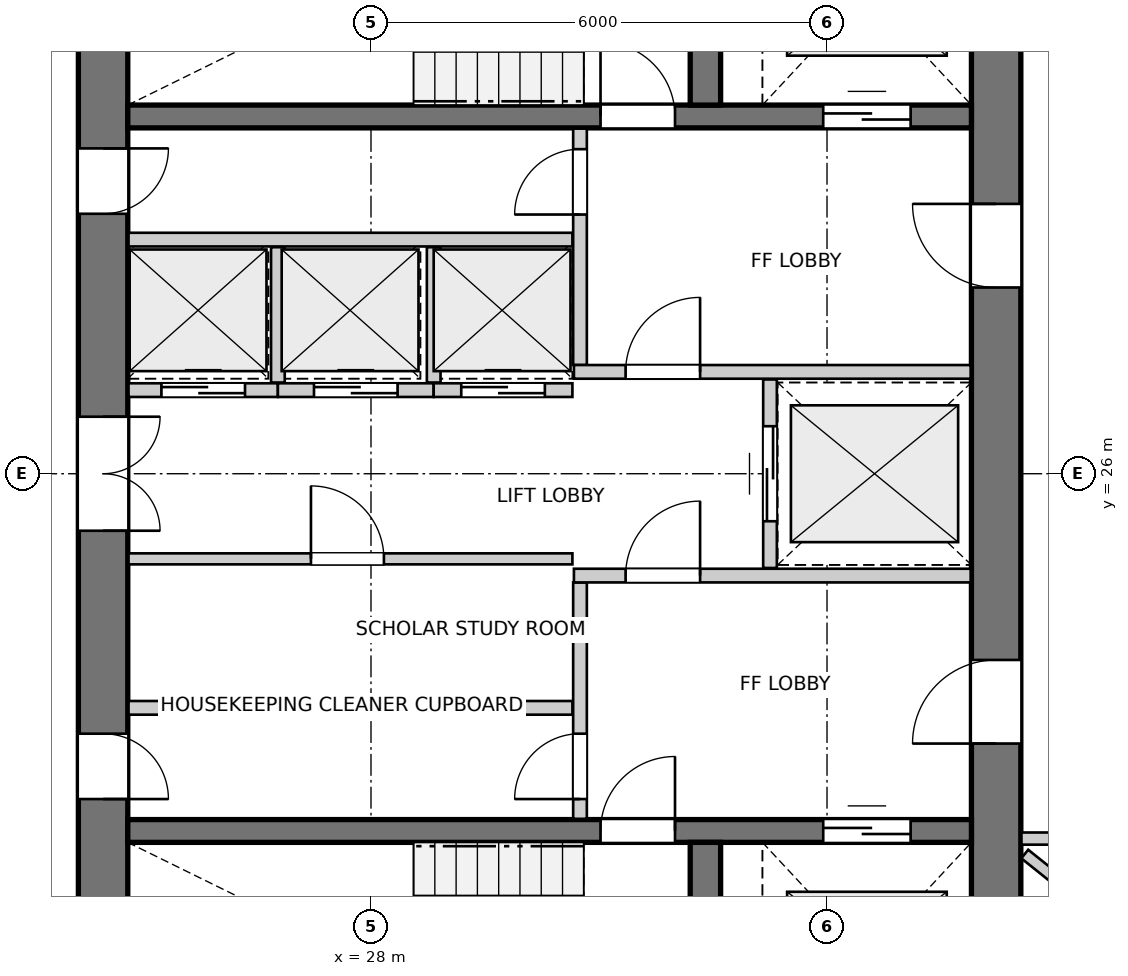
"""IFC4 building model, lengths in metres.
Left out: names, types, materials, properties, quantities, classifications, styles, units other than length and angle.
Written with IfcOpenShell. Run it as: python <this file> out.ifc"""

import sys

from ifc_helpers import new_model, si_unit, direction, frame, frame_2d, origin, place, context, subcontext, project, spatial, rectangle, extrude, source, transform, mapped, element, fill, save


model = new_model("IFC4")
c1 = context("Model", 3, precision=1e-05, world=origin(), true_north=direction((0.0, 1.0)))
c2 = subcontext(c1, "Body", "Model", "MODEL_VIEW")
j1 = project(units=[si_unit("LENGTHUNIT", "METRE"), si_unit("PLANEANGLEUNIT", "RADIAN")], contexts=[c1])
p1 = place(None, origin())
s1 = spatial("IfcSite", under=j1, at=p1, CompositionType="ELEMENT")
p2 = place(p1, origin())
s2 = spatial("IfcBuilding", under=s1, at=p2, CompositionType="ELEMENT")
p3 = place(p2, frame((0.0, 0.0, 136.2)))
s3 = spatial("IfcBuildingStorey", under=s2, at=p3, CompositionType="ELEMENT", Elevation=136.2)
p4 = place(p3, frame((24.475, 33.8, 0.0), z_axis=(0.0, 0.0, 1.0), x_axis=(0.0, -1.0, 0.0)))
e1 = element("IfcWall", 1, at=p4, inside=s3, PredefinedType="SHEAR", context=c2, shape_type="SweptSolid", body=[
    extrude(rectangle(XDim=15.6, YDim=0.65, at=frame_2d((7.8, 0.0))), origin(), (0.0, 0.0, 1.0), 2.95),
])
p5 = place(p4, frame((7.05, 0.0, 0.0)))
e2 = element("IfcOpeningElement", 2, at=p5, cuts=e1, PredefinedType="OPENING", context=c2, shape_type="SweptSolid", body=[
    extrude(rectangle(XDim=1.5, YDim=2.15, at=frame_2d((0.75, 1.075))), frame((0.0, 0.335, 0.0), z_axis=(0.0, -1.0, 0.0), x_axis=(1.0, 0.0, 0.0)), (0.0, 0.0, 1.0), 0.67),
])
p6 = place(p4, frame((3.52, 0.0, 0.0)))
e3 = element("IfcOpeningElement", 3, at=p6, cuts=e1, PredefinedType="OPENING", context=c2, shape_type="SweptSolid", body=[
    extrude(rectangle(XDim=0.86, YDim=2.05, at=frame_2d((0.43, 1.025))), frame((0.0, 0.335, 0.0), z_axis=(0.0, -1.0, 0.0), x_axis=(1.0, 0.0, 0.0)), (0.0, 0.0, 1.0), 0.67),
])
p7 = place(p4, frame((11.22, 0.0, 0.0)))
e4 = element("IfcOpeningElement", 4, at=p7, cuts=e1, PredefinedType="OPENING", context=c2, shape_type="SweptSolid", body=[
    extrude(rectangle(XDim=0.86, YDim=2.05, at=frame_2d((0.43, 1.025))), frame((0.0, 0.335, 0.0), z_axis=(0.0, -1.0, 0.0), x_axis=(1.0, 0.0, 0.0)), (0.0, 0.0, 1.0), 0.67),
])
p8 = place(p3, frame((36.225, 18.2, 0.0), z_axis=(0.0, 0.0, 1.0), x_axis=(0.0, 1.0, 0.0)))
e5 = element("IfcWall", 5, at=p8, inside=s3, PredefinedType="SHEAR", context=c2, shape_type="SweptSolid", body=[
    extrude(rectangle(XDim=15.6, YDim=0.65, at=frame_2d((7.8, 0.0))), origin(), (0.0, 0.0, 1.0), 2.95),
])
p9 = place(p8, frame((4.25, 0.0, 0.0)))
e6 = element("IfcOpeningElement", 6, at=p9, cuts=e5, PredefinedType="OPENING", context=c2, shape_type="SweptSolid", body=[
    extrude(rectangle(XDim=1.1, YDim=2.15, at=frame_2d((0.55, 1.075))), frame((0.0, 0.335, 0.0), z_axis=(0.0, -1.0, 0.0), x_axis=(1.0, 0.0, 0.0)), (0.0, 0.0, 1.0), 0.67),
])
p10 = place(p8, frame((10.25, 0.0, 0.0)))
e7 = element("IfcOpeningElement", 7, at=p10, cuts=e5, PredefinedType="OPENING", context=c2, shape_type="SweptSolid", body=[
    extrude(rectangle(XDim=1.1, YDim=2.15, at=frame_2d((0.55, 1.075))), frame((0.0, 0.335, 0.0), z_axis=(0.0, -1.0, 0.0), x_axis=(1.0, 0.0, 0.0)), (0.0, 0.0, 1.0), 0.67),
])
p11 = place(p3, frame((24.8, 21.3, 0.0), z_axis=(0.0, 0.0, 1.0), x_axis=(1.0, 0.0, 0.0)))
e8 = element("IfcWall", 8, at=p11, inside=s3, PredefinedType="SHEAR", context=c2, shape_type="SweptSolid", body=[
    extrude(rectangle(XDim=11.1, YDim=0.3, at=frame_2d((5.55, 0.0))), origin(), (0.0, 0.0, 1.0), 2.95),
])
p12 = place(p11, frame((6.22, 0.0, 0.0)))
e9 = element("IfcOpeningElement", 9, at=p12, cuts=e8, PredefinedType="OPENING", context=c2, shape_type="SweptSolid", body=[
    extrude(rectangle(XDim=0.98, YDim=2.15, at=frame_2d((0.49, 1.075))), frame((0.0, 0.16, 0.0), z_axis=(0.0, -1.0, 0.0), x_axis=(1.0, 0.0, 0.0)), (0.0, 0.0, 1.0), 0.32),
])
p13 = place(p11, frame((9.15, 0.0, 0.0)))
e10 = element("IfcOpeningElement", 10, at=p13, cuts=e8, PredefinedType="OPENING", context=c2, shape_type="SweptSolid", body=[
    extrude(rectangle(XDim=1.15, YDim=2.15, at=frame_2d((0.575, 1.075))), frame((0.0, 0.16, 0.0), z_axis=(0.0, -1.0, 0.0), x_axis=(1.0, 0.0, 0.0)), (0.0, 0.0, 1.0), 0.32),
])
p14 = place(p3, frame((32.4, 18.2, 0.0), z_axis=(0.0, 0.0, 1.0), x_axis=(0.0, 1.0, 0.0)))
e11 = element("IfcWall", 11, at=p14, inside=s3, PredefinedType="SHEAR", context=c2, shape_type="SweptSolid", body=[
    extrude(rectangle(XDim=2.95, YDim=0.4, at=frame_2d((1.475, 0.0))), origin(), (0.0, 0.0, 1.0), 2.95),
])
p15 = place(p3, frame((24.8, 30.7, 0.0), z_axis=(0.0, 0.0, 1.0), x_axis=(1.0, 0.0, 0.0)))
e12 = element("IfcWall", 12, at=p15, inside=s3, PredefinedType="SHEAR", context=c2, shape_type="SweptSolid", body=[
    extrude(rectangle(XDim=11.1, YDim=0.3, at=frame_2d((5.55, 0.0))), origin(), (0.0, 0.0, 1.0), 2.95),
])
p16 = place(p15, frame((6.22, 0.0, 0.0)))
e13 = element("IfcOpeningElement", 13, at=p16, cuts=e12, PredefinedType="OPENING", context=c2, shape_type="SweptSolid", body=[
    extrude(rectangle(XDim=0.98, YDim=2.15, at=frame_2d((0.49, 1.075))), frame((0.0, 0.16, 0.0), z_axis=(0.0, -1.0, 0.0), x_axis=(1.0, 0.0, 0.0)), (0.0, 0.0, 1.0), 0.32),
])
p17 = place(p15, frame((9.15, 0.0, 0.0)))
e14 = element("IfcOpeningElement", 14, at=p17, cuts=e12, PredefinedType="OPENING", context=c2, shape_type="SweptSolid", body=[
    extrude(rectangle(XDim=1.15, YDim=2.15, at=frame_2d((0.575, 1.075))), frame((0.0, 0.16, 0.0), z_axis=(0.0, -1.0, 0.0), x_axis=(1.0, 0.0, 0.0)), (0.0, 0.0, 1.0), 0.32),
])
p18 = place(p3, frame((32.4, 30.85, 0.0), z_axis=(0.0, 0.0, 1.0), x_axis=(0.0, 1.0, 0.0)))
e15 = element("IfcWall", 15, at=p18, inside=s3, PredefinedType="SHEAR", context=c2, shape_type="SweptSolid", body=[
    extrude(rectangle(XDim=2.95, YDim=0.4, at=frame_2d((1.475, 0.0))), origin(), (0.0, 0.0, 1.0), 2.95),
])
p19 = place(p3, frame((30.75, 21.46, 0.0), z_axis=(0.0, 0.0, 1.0), x_axis=(0.0, 1.0, 0.0)))
e16 = element("IfcWall", 16, at=p19, inside=s3, PredefinedType="PARTITIONING", context=c2, shape_type="SweptSolid", body=[
    extrude(rectangle(XDim=3.11, YDim=0.18, at=frame_2d((1.555, 0.0))), origin(), (0.0, 0.0, 1.0), 2.95),
])
p20 = place(p19, frame((0.26, 0.0, 0.0)))
e17 = element("IfcOpeningElement", 17, at=p20, cuts=e16, PredefinedType="OPENING", context=c2, shape_type="SweptSolid", body=[
    extrude(rectangle(XDim=0.86, YDim=2.05, at=frame_2d((0.43, 1.025))), frame((0.0, 0.1, 0.0), z_axis=(0.0, -1.0, 0.0), x_axis=(1.0, 0.0, 0.0)), (0.0, 0.0, 1.0), 0.2),
])
p21 = place(p3, frame((30.67, 24.66, 0.0), z_axis=(0.0, 0.0, 1.0), x_axis=(1.0, 0.0, 0.0)))
e18 = element("IfcWall", 18, at=p21, inside=s3, PredefinedType="PARTITIONING", context=c2, shape_type="SweptSolid", body=[
    extrude(rectangle(XDim=5.22, YDim=0.18, at=frame_2d((2.61, 0.0))), origin(), (0.0, 0.0, 1.0), 2.95),
])
p22 = place(p21, frame((0.68, 0.0, 0.0)))
e19 = element("IfcOpeningElement", 19, at=p22, cuts=e18, PredefinedType="OPENING", context=c2, shape_type="SweptSolid", body=[
    extrude(rectangle(XDim=0.98, YDim=2.15, at=frame_2d((0.49, 1.075))), frame((0.0, 0.1, 0.0), z_axis=(0.0, -1.0, 0.0), x_axis=(1.0, 0.0, 0.0)), (0.0, 0.0, 1.0), 0.2),
])
p23 = place(p3, frame((30.75, 27.43, 0.0), z_axis=(0.0, 0.0, 1.0), x_axis=(0.0, 1.0, 0.0)))
e20 = element("IfcWall", 20, at=p23, inside=s3, PredefinedType="PARTITIONING", context=c2, shape_type="SweptSolid", body=[
    extrude(rectangle(XDim=3.11, YDim=0.18, at=frame_2d((1.555, 0.0))), origin(), (0.0, 0.0, 1.0), 2.95),
])
p24 = place(p23, frame((1.98, 0.0, 0.0)))
e21 = element("IfcOpeningElement", 21, at=p24, cuts=e20, PredefinedType="OPENING", context=c2, shape_type="SweptSolid", body=[
    extrude(rectangle(XDim=0.86, YDim=2.05, at=frame_2d((0.43, 1.025))), frame((0.0, 0.1, 0.0), z_axis=(0.0, -1.0, 0.0), x_axis=(1.0, 0.0, 0.0)), (0.0, 0.0, 1.0), 0.2),
])
p25 = place(p3, frame((30.67, 27.34, 0.0), z_axis=(0.0, 0.0, 1.0), x_axis=(1.0, 0.0, 0.0)))
e22 = element("IfcWall", 22, at=p25, inside=s3, PredefinedType="PARTITIONING", context=c2, shape_type="SweptSolid", body=[
    extrude(rectangle(XDim=5.22, YDim=0.18, at=frame_2d((2.61, 0.0))), origin(), (0.0, 0.0, 1.0), 2.95),
])
p26 = place(p25, frame((0.68, 0.0, 0.0)))
e23 = element("IfcOpeningElement", 23, at=p26, cuts=e22, PredefinedType="OPENING", context=c2, shape_type="SweptSolid", body=[
    extrude(rectangle(XDim=0.98, YDim=2.15, at=frame_2d((0.49, 1.075))), frame((0.0, 0.1, 0.0), z_axis=(0.0, -1.0, 0.0), x_axis=(1.0, 0.0, 0.0)), (0.0, 0.0, 1.0), 0.2),
])
p27 = place(p3, frame((33.25, 24.76, 0.0), z_axis=(0.0, 0.0, 1.0), x_axis=(0.0, 1.0, 0.0)))
e24 = element("IfcWall", 24, at=p27, inside=s3, PredefinedType="PARTITIONING", context=c2, shape_type="SweptSolid", body=[
    extrude(rectangle(XDim=2.48, YDim=0.18, at=frame_2d((1.24, 0.0))), origin(), (0.0, 0.0, 1.0), 2.95),
])
p28 = place(p27, frame((0.615, 0.0, 0.0)))
e25 = element("IfcOpeningElement", 25, at=p28, cuts=e24, PredefinedType="OPENING", context=c2, shape_type="SweptSolid", body=[
    extrude(rectangle(XDim=1.25, YDim=2.15, at=frame_2d((0.625, 1.075))), frame((0.0, 0.1, 0.0), z_axis=(0.0, -1.0, 0.0), x_axis=(1.0, 0.0, 0.0)), (0.0, 0.0, 1.0), 0.2),
])
p29 = place(p3, frame((24.81, 22.92, 0.0), z_axis=(0.0, 0.0, 1.0), x_axis=(1.0, 0.0, 0.0)))
e26 = element("IfcWall", 26, at=p29, inside=s3, PredefinedType="PARTITIONING", context=c2, shape_type="SweptSolid", body=[
    extrude(rectangle(XDim=5.84, YDim=0.18, at=frame_2d((2.92, 0.0))), origin(), (0.0, 0.0, 1.0), 2.95),
])
p30 = place(p3, frame((24.81, 24.88, 0.0), z_axis=(0.0, 0.0, 1.0), x_axis=(1.0, 0.0, 0.0)))
e27 = element("IfcWall", 27, at=p30, inside=s3, PredefinedType="PARTITIONING", context=c2, shape_type="SweptSolid", body=[
    extrude(rectangle(XDim=5.84, YDim=0.145, at=frame_2d((2.92, 0.0))), origin(), (0.0, 0.0, 1.0), 2.95),
])
p31 = place(p30, frame((2.4, 0.0, 0.0)))
e28 = element("IfcOpeningElement", 28, at=p31, cuts=e27, PredefinedType="OPENING", context=c2, shape_type="SweptSolid", body=[
    extrude(rectangle(XDim=0.96, YDim=2.1, at=frame_2d((0.48, 1.05))), frame((0.0, 0.083, 0.0), z_axis=(0.0, -1.0, 0.0), x_axis=(1.0, 0.0, 0.0)), (0.0, 0.0, 1.0), 0.165),
])
p32 = place(p3, frame((24.81, 29.08, 0.0), z_axis=(0.0, 0.0, 1.0), x_axis=(1.0, 0.0, 0.0)))
e29 = element("IfcWall", 29, at=p32, inside=s3, PredefinedType="PARTITIONING", context=c2, shape_type="SweptSolid", body=[
    extrude(rectangle(XDim=5.84, YDim=0.18, at=frame_2d((2.92, 0.0))), origin(), (0.0, 0.0, 1.0), 2.95),
])
p33 = place(p3, frame((24.81, 27.1, 0.0), z_axis=(0.0, 0.0, 1.0), x_axis=(1.0, 0.0, 0.0)))
e30 = element("IfcWall", 30, at=p33, inside=s3, PredefinedType="PARTITIONING", context=c2, shape_type="SweptSolid", body=[
    extrude(rectangle(XDim=1.965, YDim=0.18, at=frame_2d((0.982, 0.0))), origin(), (0.0, 0.0, 1.0), 2.95),
])
p34 = place(p33, frame((0.433, 0.0, 0.0)))
e31 = element("IfcOpeningElement", 31, at=p34, cuts=e30, PredefinedType="OPENING", context=c2, shape_type="SweptSolid", body=[
    extrude(rectangle(XDim=1.1, YDim=2.15, at=frame_2d((0.55, 1.075))), frame((0.0, 0.1, 0.0), z_axis=(0.0, -1.0, 0.0), x_axis=(1.0, 0.0, 0.0)), (0.0, 0.0, 1.0), 0.2),
])
p35 = place(p3, frame((26.775, 27.1, 0.0), z_axis=(0.0, 0.0, 1.0), x_axis=(1.0, 0.0, 0.0)))
e32 = element("IfcWall", 32, at=p35, inside=s3, PredefinedType="PARTITIONING", context=c2, shape_type="SweptSolid", body=[
    extrude(rectangle(XDim=2.05, YDim=0.18, at=frame_2d((1.025, 0.0))), origin(), (0.0, 0.0, 1.0), 2.95),
])
p36 = place(p35, frame((0.475, 0.0, 0.0)))
e33 = element("IfcOpeningElement", 33, at=p36, cuts=e32, PredefinedType="OPENING", context=c2, shape_type="SweptSolid", body=[
    extrude(rectangle(XDim=1.1, YDim=2.15, at=frame_2d((0.55, 1.075))), frame((0.0, 0.1, 0.0), z_axis=(0.0, -1.0, 0.0), x_axis=(1.0, 0.0, 0.0)), (0.0, 0.0, 1.0), 0.2),
])
p37 = place(p3, frame((26.775, 27.2, 0.0), z_axis=(0.0, 0.0, 1.0), x_axis=(0.0, 1.0, 0.0)))
e34 = element("IfcWall", 34, at=p37, inside=s3, PredefinedType="PARTITIONING", context=c2, shape_type="SweptSolid", body=[
    extrude(rectangle(XDim=1.78, YDim=0.18, at=frame_2d((0.89, 0.0))), origin(), (0.0, 0.0, 1.0), 2.95),
])
p38 = place(p3, frame((28.825, 27.1, 0.0), z_axis=(0.0, 0.0, 1.0), x_axis=(1.0, 0.0, 0.0)))
e35 = element("IfcWall", 35, at=p38, inside=s3, PredefinedType="PARTITIONING", context=c2, shape_type="SweptSolid", body=[
    extrude(rectangle(XDim=1.825, YDim=0.18, at=frame_2d((0.913, 0.0))), origin(), (0.0, 0.0, 1.0), 2.95),
])
p39 = place(p38, frame((0.363, 0.0, 0.0)))
e36 = element("IfcOpeningElement", 36, at=p39, cuts=e35, PredefinedType="OPENING", context=c2, shape_type="SweptSolid", body=[
    extrude(rectangle(XDim=1.1, YDim=2.15, at=frame_2d((0.55, 1.075))), frame((0.0, 0.1, 0.0), z_axis=(0.0, -1.0, 0.0), x_axis=(1.0, 0.0, 0.0)), (0.0, 0.0, 1.0), 0.2),
])
p40 = place(p3, frame((28.825, 27.2, 0.0), z_axis=(0.0, 0.0, 1.0), x_axis=(0.0, 1.0, 0.0)))
e37 = element("IfcWall", 37, at=p40, inside=s3, PredefinedType="PARTITIONING", context=c2, shape_type="SweptSolid", body=[
    extrude(rectangle(XDim=1.78, YDim=0.18, at=frame_2d((0.89, 0.0))), origin(), (0.0, 0.0, 1.0), 2.95),
])
p41 = place(p3, frame((36.602, 20.997, 0.0), z_axis=(0.0, 0.0, 1.0), x_axis=(0.780696683128, -0.624910144703, 0.0)))
e38 = element("IfcWall", 38, at=p41, inside=s3, PredefinedType="PARTITIONING", context=c2, shape_type="SweptSolid", body=[
    extrude(rectangle(XDim=7.474, YDim=0.145, at=frame_2d((3.737, 0.0))), origin(), (0.0, 0.0, 1.0), 2.95),
])
p42 = place(p3, frame((36.558, 21.2, 0.0), z_axis=(0.0, 0.0, 1.0), x_axis=(1.0, 0.0, 0.0)))
e39 = element("IfcWall", 39, at=p42, inside=s3, PredefinedType="PARTITIONING", context=c2, shape_type="SweptSolid", body=[
    extrude(rectangle(XDim=1.684, YDim=0.16, at=frame_2d((0.842, 0.0))), origin(), (0.0, 0.0, 1.0), 2.95),
])
m1 = source(origin(), c2, "Body", "SweptSolid", [
    extrude(rectangle(XDim=0.98, YDim=2.15, at=frame_2d((0.49, 1.075))), frame((0.0, 0.025, 0.0), z_axis=(0.0, -1.0, 0.0), x_axis=(1.0, 0.0, 0.0)), (0.0, 0.0, 1.0), 0.05),
])
p43 = place(p12, origin())
e40 = element("IfcDoor", 40, at=p43, inside=s3, OperationType="SINGLE_SWING_RIGHT", PredefinedType="DOOR", context=c2, shape_type="MappedRepresentation", body=[
    mapped(m1, transform((0.0, 0.0, 0.0), x_axis=(1.0, 0.0, 0.0), y_axis=(0.0, 1.0, 0.0), z_axis=(0.0, 0.0, 1.0), scale=1.0)),
])
fill(e9, e40)
m2 = source(origin(), c2, "Body", "SweptSolid", [
    extrude(rectangle(XDim=1.15, YDim=2.15, at=frame_2d((0.575, 1.075))), frame((0.0, 0.025, 0.0), z_axis=(0.0, -1.0, 0.0), x_axis=(1.0, 0.0, 0.0)), (0.0, 0.0, 1.0), 0.05),
])
p44 = place(p13, origin())
e41 = element("IfcDoor", 41, at=p44, inside=s3, OperationType="DOUBLE_DOOR_SLIDING", PredefinedType="DOOR", context=c2, shape_type="MappedRepresentation", body=[
    mapped(m2, transform((0.0, 0.0, 0.0), x_axis=(1.0, 0.0, 0.0), y_axis=(0.0, 1.0, 0.0), z_axis=(0.0, 0.0, 1.0), scale=1.0)),
])
fill(e10, e41)
p45 = place(p16, origin())
e42 = element("IfcDoor", 42, at=p45, inside=s3, OperationType="SINGLE_SWING_LEFT", PredefinedType="DOOR", context=c2, shape_type="MappedRepresentation", body=[
    mapped(m1, transform((0.0, 0.0, 0.0), x_axis=(1.0, 0.0, 0.0), y_axis=(0.0, 1.0, 0.0), z_axis=(0.0, 0.0, 1.0), scale=1.0)),
])
fill(e13, e42)
p46 = place(p17, origin())
e43 = element("IfcDoor", 43, at=p46, inside=s3, OperationType="DOUBLE_DOOR_SLIDING", PredefinedType="DOOR", context=c2, shape_type="MappedRepresentation", body=[
    mapped(m2, transform((0.0, 0.0, 0.0), x_axis=(1.0, 0.0, 0.0), y_axis=(0.0, 1.0, 0.0), z_axis=(0.0, 0.0, 1.0), scale=1.0)),
])
fill(e14, e43)
m3 = source(origin(), c2, "Body", "SweptSolid", [
    extrude(rectangle(XDim=1.1, YDim=2.15, at=frame_2d((0.55, 1.075))), frame((0.0, 0.025, 0.0), z_axis=(0.0, -1.0, 0.0), x_axis=(1.0, 0.0, 0.0)), (0.0, 0.0, 1.0), 0.05),
])
p47 = place(p9, origin())
e44 = element("IfcDoor", 44, at=p47, inside=s3, OperationType="SINGLE_SWING_LEFT", PredefinedType="DOOR", context=c2, shape_type="MappedRepresentation", body=[
    mapped(m3, transform((0.0, 0.0, 0.0), x_axis=(1.0, 0.0, 0.0), y_axis=(0.0, 1.0, 0.0), z_axis=(0.0, 0.0, 1.0), scale=1.0)),
])
fill(e6, e44)
p48 = place(p10, origin())
e45 = element("IfcDoor", 45, at=p48, inside=s3, OperationType="SINGLE_SWING_RIGHT", PredefinedType="DOOR", context=c2, shape_type="MappedRepresentation", body=[
    mapped(m3, transform((0.0, 0.0, 0.0), x_axis=(1.0, 0.0, 0.0), y_axis=(0.0, 1.0, 0.0), z_axis=(0.0, 0.0, 1.0), scale=1.0)),
])
fill(e7, e45)
m4 = source(origin(), c2, "Body", "SweptSolid", [
    extrude(rectangle(XDim=1.5, YDim=2.15, at=frame_2d((0.75, 1.075))), frame((0.0, 0.025, 0.0), z_axis=(0.0, -1.0, 0.0), x_axis=(1.0, 0.0, 0.0)), (0.0, 0.0, 1.0), 0.05),
])
p49 = place(p5, origin())
e46 = element("IfcDoor", 46, at=p49, inside=s3, OperationType="DOUBLE_DOOR_SINGLE_SWING", PredefinedType="DOOR", context=c2, shape_type="MappedRepresentation", body=[
    mapped(m4, transform((0.0, 0.0, 0.0), x_axis=(1.0, 0.0, 0.0), y_axis=(0.0, 1.0, 0.0), z_axis=(0.0, 0.0, 1.0), scale=1.0)),
])
fill(e2, e46)
m5 = source(origin(), c2, "Body", "SweptSolid", [
    extrude(rectangle(XDim=0.86, YDim=2.05, at=frame_2d((0.43, 1.025))), frame((0.0, 0.025, 0.0), z_axis=(0.0, -1.0, 0.0), x_axis=(1.0, 0.0, 0.0)), (0.0, 0.0, 1.0), 0.05),
])
p50 = place(p6, origin())
e47 = element("IfcDoor", 47, at=p50, inside=s3, OperationType="SINGLE_SWING_LEFT", PredefinedType="DOOR", context=c2, shape_type="MappedRepresentation", body=[
    mapped(m5, transform((0.0, 0.0, 0.0), x_axis=(1.0, 0.0, 0.0), y_axis=(0.0, 1.0, 0.0), z_axis=(0.0, 0.0, 1.0), scale=1.0)),
])
fill(e3, e47)
p51 = place(p7, origin())
e48 = element("IfcDoor", 48, at=p51, inside=s3, OperationType="SINGLE_SWING_RIGHT", PredefinedType="DOOR", context=c2, shape_type="MappedRepresentation", body=[
    mapped(m5, transform((0.0, 0.0, 0.0), x_axis=(1.0, 0.0, 0.0), y_axis=(0.0, 1.0, 0.0), z_axis=(0.0, 0.0, 1.0), scale=1.0)),
])
fill(e4, e48)
p52 = place(p20, origin())
e49 = element("IfcDoor", 49, at=p52, inside=s3, OperationType="SINGLE_SWING_LEFT", PredefinedType="DOOR", context=c2, shape_type="MappedRepresentation", body=[
    mapped(m5, transform((0.0, 0.0, 0.0), x_axis=(1.0, 0.0, 0.0), y_axis=(0.0, 1.0, 0.0), z_axis=(0.0, 0.0, 1.0), scale=1.0)),
])
fill(e17, e49)
p53 = place(p22, origin())
e50 = element("IfcDoor", 50, at=p53, inside=s3, OperationType="SINGLE_SWING_RIGHT", PredefinedType="DOOR", context=c2, shape_type="MappedRepresentation", body=[
    mapped(m1, transform((0.0, 0.0, 0.0), x_axis=(1.0, 0.0, 0.0), y_axis=(0.0, 1.0, 0.0), z_axis=(0.0, 0.0, 1.0), scale=1.0)),
])
fill(e19, e50)
p54 = place(p24, origin())
e51 = element("IfcDoor", 51, at=p54, inside=s3, OperationType="SINGLE_SWING_LEFT", PredefinedType="DOOR", context=c2, shape_type="MappedRepresentation", body=[
    mapped(m5, transform((0.0, 0.0, 0.0), x_axis=(1.0, 0.0, 0.0), y_axis=(0.0, 1.0, 0.0), z_axis=(0.0, 0.0, 1.0), scale=1.0)),
])
fill(e21, e51)
p55 = place(p26, origin())
e52 = element("IfcDoor", 52, at=p55, inside=s3, OperationType="SINGLE_SWING_RIGHT", PredefinedType="DOOR", context=c2, shape_type="MappedRepresentation", body=[
    mapped(m1, transform((0.0, 0.0, 0.0), x_axis=(1.0, 0.0, 0.0), y_axis=(0.0, 1.0, 0.0), z_axis=(0.0, 0.0, 1.0), scale=1.0)),
])
fill(e23, e52)
m6 = source(origin(), c2, "Body", "SweptSolid", [
    extrude(rectangle(XDim=1.25, YDim=2.15, at=frame_2d((0.625, 1.075))), frame((0.0, 0.025, 0.0), z_axis=(0.0, -1.0, 0.0), x_axis=(1.0, 0.0, 0.0)), (0.0, 0.0, 1.0), 0.05),
])
p56 = place(p28, origin())
e53 = element("IfcDoor", 53, at=p56, inside=s3, OperationType="DOUBLE_DOOR_SLIDING", PredefinedType="DOOR", context=c2, shape_type="MappedRepresentation", body=[
    mapped(m6, transform((0.0, 0.0, 0.0), x_axis=(1.0, 0.0, 0.0), y_axis=(0.0, 1.0, 0.0), z_axis=(0.0, 0.0, 1.0), scale=1.0)),
])
fill(e25, e53)
m7 = source(origin(), c2, "Body", "SweptSolid", [
    extrude(rectangle(XDim=0.96, YDim=2.1, at=frame_2d((0.48, 1.05))), frame((0.0, 0.025, 0.0), z_axis=(0.0, -1.0, 0.0), x_axis=(1.0, 0.0, 0.0)), (0.0, 0.0, 1.0), 0.05),
])
p57 = place(p31, origin())
e54 = element("IfcDoor", 54, at=p57, inside=s3, OperationType="SINGLE_SWING_LEFT", PredefinedType="DOOR", context=c2, shape_type="MappedRepresentation", body=[
    mapped(m7, transform((0.0, 0.0, 0.0), x_axis=(1.0, 0.0, 0.0), y_axis=(0.0, 1.0, 0.0), z_axis=(0.0, 0.0, 1.0), scale=1.0)),
])
fill(e28, e54)
p58 = place(p34, origin())
e55 = element("IfcDoor", 55, at=p58, inside=s3, OperationType="DOUBLE_DOOR_SLIDING", PredefinedType="DOOR", context=c2, shape_type="MappedRepresentation", body=[
    mapped(m3, transform((0.0, 0.0, 0.0), x_axis=(1.0, 0.0, 0.0), y_axis=(0.0, 1.0, 0.0), z_axis=(0.0, 0.0, 1.0), scale=1.0)),
])
fill(e31, e55)
p59 = place(p36, origin())
e56 = element("IfcDoor", 56, at=p59, inside=s3, OperationType="DOUBLE_DOOR_SLIDING", PredefinedType="DOOR", context=c2, shape_type="MappedRepresentation", body=[
    mapped(m3, transform((0.0, 0.0, 0.0), x_axis=(1.0, 0.0, 0.0), y_axis=(0.0, 1.0, 0.0), z_axis=(0.0, 0.0, 1.0), scale=1.0)),
])
fill(e33, e56)
p60 = place(p39, origin())
e57 = element("IfcDoor", 57, at=p60, inside=s3, OperationType="DOUBLE_DOOR_SLIDING", PredefinedType="DOOR", context=c2, shape_type="MappedRepresentation", body=[
    mapped(m3, transform((0.0, 0.0, 0.0), x_axis=(1.0, 0.0, 0.0), y_axis=(0.0, 1.0, 0.0), z_axis=(0.0, 0.0, 1.0), scale=1.0)),
])
fill(e36, e57)
save(model, sys.argv[1])
